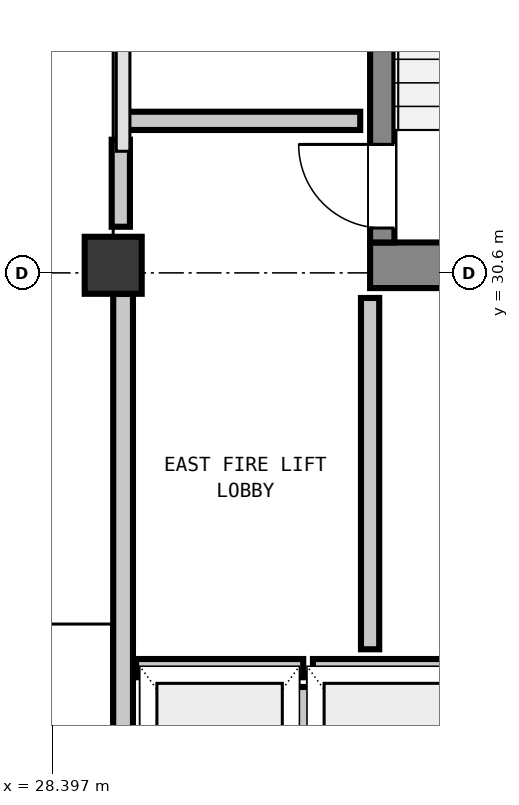
"""IFC4 building model, lengths in metres.
Left out: names, types, materials, properties, quantities, classifications, styles, units other than length and angle.
Written with IfcOpenShell. Run it as: python <this file> out.ifc"""

import sys

from ifc_helpers import new_model, si_unit, direction, frame, frame_2d, origin, origin_2d, place, context, subcontext, project, spatial, rectangle, extrude, element, fill, save


model = new_model("IFC4")
c1 = context("Model", 3, precision=1e-05, world=origin(), true_north=direction((0.0, 1.0)))
c2 = subcontext(c1, "Body", "Model", "MODEL_VIEW")
j1 = project(units=[si_unit("LENGTHUNIT", "METRE"), si_unit("PLANEANGLEUNIT", "RADIAN")], contexts=[c1])
p1 = place(None, origin())
s1 = spatial("IfcSite", under=j1, at=p1, CompositionType="ELEMENT")
p2 = place(p1, origin())
s2 = spatial("IfcBuilding", under=s1, at=p2, CompositionType="ELEMENT")
p3 = place(p2, frame((0.0, 0.0, 282.98)))
s3 = spatial("IfcBuildingStorey", under=s2, at=p3, CompositionType="ELEMENT", Elevation=282.98)
p4 = place(p3, frame((32.58, 30.7, 0.0), z_axis=(0.0, 0.0, 1.0), x_axis=(1.0, 0.0, 0.0)))
e1 = element("IfcWall", 1, at=p4, inside=s3, PredefinedType="SHEAR", context=c2, shape_type="SweptSolid", body=[
    extrude(rectangle(XDim=4.08, YDim=0.6, at=frame_2d((2.04, 0.0))), origin(), (0.0, 0.0, 1.0), 4.9),
])
p5 = place(p3, frame((32.74, 31.0, 0.0), z_axis=(0.0, 0.0, 1.0), x_axis=(0.0, 1.0, 0.0)))
e2 = element("IfcWall", 2, at=p5, inside=s3, PredefinedType="SHEAR", context=c2, shape_type="SweptSolid", body=[
    extrude(rectangle(XDim=7.8, YDim=0.32, at=frame_2d((3.9, 0.0))), origin(), (0.0, 0.0, 1.0), 4.9),
])
p6 = place(p5, frame((0.19, 0.0, 0.0)))
e3 = element("IfcOpeningElement", 3, at=p6, cuts=e2, PredefinedType="OPENING", context=c2, shape_type="SweptSolid", body=[
    extrude(rectangle(XDim=1.1, YDim=2.15, at=frame_2d((0.55, 1.075))), frame((0.0, 0.17, 0.0), z_axis=(0.0, -1.0, 0.0), x_axis=(1.0, 0.0, 0.0)), (0.0, 0.0, 1.0), 0.34),
])
p7 = place(p3, frame((29.2, 30.7, 0.0), z_axis=(0.0, 0.0, 1.0), x_axis=(1.0, 0.0, 0.0)))
e4 = element("IfcColumn", 4, at=p7, inside=s3, PredefinedType="COLUMN", context=c2, shape_type="SweptSolid", body=[
    extrude(rectangle(XDim=0.75, YDim=0.75, at=origin_2d()), origin(), (0.0, 0.0, 1.0), 4.9),
])
p8 = place(p3, frame((29.33, 22.3, 0.0), z_axis=(0.0, 0.0, 1.0), x_axis=(0.0, 1.0, 0.0)))
e5 = element("IfcWall", 5, at=p8, inside=s3, PredefinedType="STANDARD", context=c2, shape_type="SweptSolid", body=[
    extrude(rectangle(XDim=8.025, YDim=0.26, at=frame_2d((4.012, 0.0))), origin(), (0.0, 0.0, 1.0), 3.754),
])
p9 = place(p3, frame((29.5, 25.4, 0.0), z_axis=(0.0, 0.0, 1.0), x_axis=(1.0, 0.0, 0.0)))
e6 = element("IfcWall", 6, at=p9, inside=s3, PredefinedType="PARTITIONING", context=c2, shape_type="SweptSolid", body=[
    extrude(rectangle(XDim=2.2, YDim=0.24, at=frame_2d((1.1, 0.0))), origin(), (0.0, 0.0, 1.0), 4.62),
])
p10 = place(p3, frame((31.7, 22.848, 0.0), z_axis=(0.0, 0.0, 1.0), x_axis=(0.0, 1.0, 0.0)))
e7 = element("IfcWall", 7, at=p10, inside=s3, PredefinedType="PARTITIONING", context=c2, shape_type="SweptSolid", body=[
    extrude(rectangle(XDim=2.304, YDim=0.24, at=frame_2d((1.152, 0.0))), origin(), (0.0, 0.0, 1.0), 4.62),
])
p11 = place(p3, frame((31.828, 25.4, 0.0), z_axis=(0.0, 0.0, 1.0), x_axis=(1.0, 0.0, 0.0)))
e8 = element("IfcWall", 8, at=p11, inside=s3, PredefinedType="PARTITIONING", context=c2, shape_type="SweptSolid", body=[
    extrude(rectangle(XDim=2.072, YDim=0.24, at=frame_2d((1.036, 0.0))), origin(), (0.0, 0.0, 1.0), 4.62),
])
p12 = place(p3, frame((29.3, 32.6, 0.0), z_axis=(0.0, 0.0, 1.0), x_axis=(1.0, 0.0, 0.0)))
e9 = element("IfcWall", 9, at=p12, inside=s3, PredefinedType="PARTITIONING", context=c2, shape_type="SweptSolid", body=[
    extrude(rectangle(XDim=3.15, YDim=0.24, at=frame_2d((1.575, 0.0))), origin(), (0.0, 0.0, 1.0), 4.62),
])
p13 = place(p3, frame((29.3, 31.207, 0.0), z_axis=(0.0, 0.0, 1.0), x_axis=(0.0, 1.0, 0.0)))
e10 = element("IfcWall", 10, at=p13, inside=s3, PredefinedType="PARTITIONING", context=c2, shape_type="SweptSolid", body=[
    extrude(rectangle(XDim=1.145, YDim=0.24, at=frame_2d((0.573, 0.0))), origin(), (0.0, 0.0, 1.0), 3.912),
])
p14 = place(p3, frame((32.58, 25.648, 0.0), z_axis=(0.0, 0.0, 1.0), x_axis=(0.0, 1.0, 0.0)))
e11 = element("IfcWall", 11, at=p14, inside=s3, PredefinedType="PARTITIONING", context=c2, shape_type="SweptSolid", body=[
    extrude(rectangle(XDim=4.622, YDim=0.24, at=frame_2d((2.311, 0.0))), origin(), (0.0, 0.0, 1.0), 4.62),
])
p15 = place(p6, origin())
e12 = element("IfcDoor", 12, at=p15, inside=s3, OperationType="SINGLE_SWING_RIGHT", PredefinedType="DOOR", context=c2, shape_type="SweptSolid", body=[
    extrude(rectangle(XDim=1.1, YDim=2.15, at=frame_2d((0.55, 1.075))), frame((0.0, 0.025, 0.0), z_axis=(0.0, -1.0, 0.0), x_axis=(1.0, 0.0, 0.0)), (0.0, 0.0, 1.0), 0.05),
])
fill(e3, e12)
save(model, sys.argv[1])
